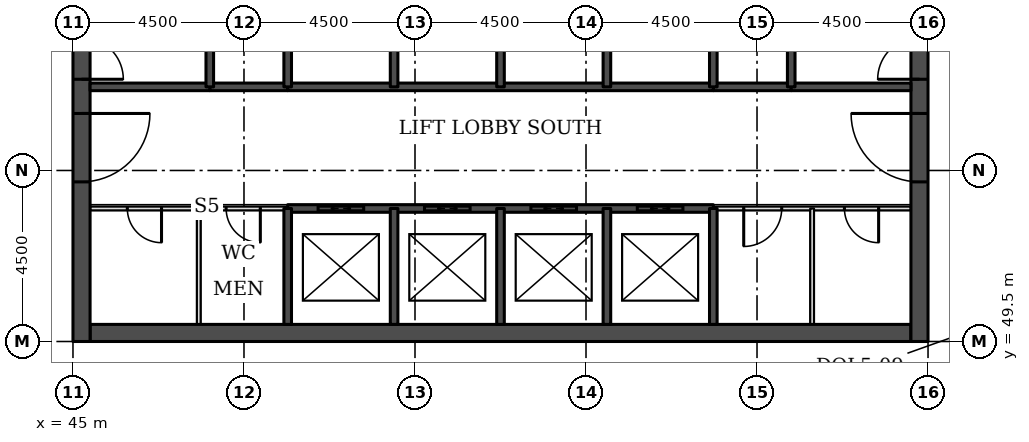
"""IFC4 building model, lengths in metres.
Left out: names, types, materials, properties, quantities, classifications, styles, units other than length and angle.
Written with IfcOpenShell. Run it as: python <this file> out.ifc"""

import sys

from ifc_helpers import new_model, si_unit, direction, frame, frame_2d, origin, place, context, subcontext, project, spatial, rectangle, extrude, element, fill, save


model = new_model("IFC4")
c1 = context("Model", 3, precision=1e-05, world=origin(), true_north=direction((0.0, 1.0)))
c2 = subcontext(c1, "Body", "Model", "MODEL_VIEW")
j1 = project(units=[si_unit("LENGTHUNIT", "METRE"), si_unit("PLANEANGLEUNIT", "RADIAN")], contexts=[c1])
p1 = place(None, origin())
s1 = spatial("IfcSite", under=j1, at=p1, CompositionType="ELEMENT")
p2 = place(p1, origin())
s2 = spatial("IfcBuilding", under=s1, at=p2, CompositionType="ELEMENT")
p3 = place(p2, frame((0.0, 0.0, 112.2)))
s3 = spatial("IfcBuildingStorey", under=s2, at=p3, CompositionType="ELEMENT", Elevation=112.2)
p4 = place(p3, frame((45.45, 49.725, 0.0), z_axis=(0.0, 0.0, 1.0), x_axis=(1.0, 0.0, 0.0)))
e1 = element("IfcWall", 1, at=p4, inside=s3, PredefinedType="SHEAR", context=c2, shape_type="SweptSolid", body=[
    extrude(rectangle(XDim=21.6, YDim=0.45, at=frame_2d((10.8, 0.0))), origin(), (0.0, 0.0, 1.0), 3.7),
])
p5 = place(p3, frame((45.225, 49.5, 0.0), z_axis=(0.0, 0.0, 1.0), x_axis=(0.0, 1.0, 0.0)))
e2 = element("IfcWall", 2, at=p5, inside=s3, PredefinedType="SHEAR", context=c2, shape_type="SweptSolid", body=[
    extrude(rectangle(XDim=22.5, YDim=0.45, at=frame_2d((11.25, 0.0))), origin(), (0.0, 0.0, 1.0), 3.7),
])
p6 = place(p5, frame((4.2, 0.0, 0.0)))
e3 = element("IfcOpeningElement", 3, at=p6, cuts=e2, PredefinedType="OPENING", context=c2, shape_type="SweptSolid", body=[
    extrude(rectangle(XDim=1.8, YDim=2.1, at=frame_2d((0.9, 1.05))), frame((0.0, 0.235, 0.0), z_axis=(0.0, -1.0, 0.0), x_axis=(1.0, 0.0, 0.0)), (0.0, 0.0, 1.0), 0.47),
])
p7 = place(p5, frame((6.9, 0.0, 0.0)))
e4 = element("IfcOpeningElement", 4, at=p7, cuts=e2, PredefinedType="OPENING", context=c2, shape_type="SweptSolid", body=[
    extrude(rectangle(XDim=1.1, YDim=2.1, at=frame_2d((0.55, 1.05))), frame((0.0, 0.235, 0.0), z_axis=(0.0, -1.0, 0.0), x_axis=(1.0, 0.0, 0.0)), (0.0, 0.0, 1.0), 0.47),
])
p8 = place(p5, frame((13.6, 0.0, 0.0)))
e5 = element("IfcOpeningElement", 5, at=p8, cuts=e2, PredefinedType="OPENING", context=c2, shape_type="SweptSolid", body=[
    extrude(rectangle(XDim=1.1, YDim=2.1, at=frame_2d((0.55, 1.05))), frame((0.0, 0.235, 0.0), z_axis=(0.0, -1.0, 0.0), x_axis=(1.0, 0.0, 0.0)), (0.0, 0.0, 1.0), 0.47),
])
p9 = place(p5, frame((16.5, 0.0, 0.0)))
e6 = element("IfcOpeningElement", 6, at=p9, cuts=e2, PredefinedType="OPENING", context=c2, shape_type="SweptSolid", body=[
    extrude(rectangle(XDim=1.8, YDim=2.1, at=frame_2d((0.9, 1.05))), frame((0.0, 0.235, 0.0), z_axis=(0.0, -1.0, 0.0), x_axis=(1.0, 0.0, 0.0)), (0.0, 0.0, 1.0), 0.47),
])
p10 = place(p3, frame((67.275, 49.5, 0.0), z_axis=(0.0, 0.0, 1.0), x_axis=(0.0, 1.0, 0.0)))
e7 = element("IfcWall", 7, at=p10, inside=s3, PredefinedType="SHEAR", context=c2, shape_type="SweptSolid", body=[
    extrude(rectangle(XDim=22.5, YDim=0.45, at=frame_2d((11.25, 0.0))), origin(), (0.0, 0.0, 1.0), 3.7),
])
p11 = place(p10, frame((4.2, 0.0, 0.0)))
e8 = element("IfcOpeningElement", 8, at=p11, cuts=e7, PredefinedType="OPENING", context=c2, shape_type="SweptSolid", body=[
    extrude(rectangle(XDim=1.8, YDim=2.1, at=frame_2d((0.9, 1.05))), frame((0.0, 0.235, 0.0), z_axis=(0.0, -1.0, 0.0), x_axis=(1.0, 0.0, 0.0)), (0.0, 0.0, 1.0), 0.47),
])
p12 = place(p10, frame((6.9, 0.0, 0.0)))
e9 = element("IfcOpeningElement", 9, at=p12, cuts=e7, PredefinedType="OPENING", context=c2, shape_type="SweptSolid", body=[
    extrude(rectangle(XDim=1.1, YDim=2.1, at=frame_2d((0.55, 1.05))), frame((0.0, 0.235, 0.0), z_axis=(0.0, -1.0, 0.0), x_axis=(1.0, 0.0, 0.0)), (0.0, 0.0, 1.0), 0.47),
])
p13 = place(p10, frame((13.6, 0.0, 0.0)))
e10 = element("IfcOpeningElement", 10, at=p13, cuts=e7, PredefinedType="OPENING", context=c2, shape_type="SweptSolid", body=[
    extrude(rectangle(XDim=1.1, YDim=2.1, at=frame_2d((0.55, 1.05))), frame((0.0, 0.235, 0.0), z_axis=(0.0, -1.0, 0.0), x_axis=(1.0, 0.0, 0.0)), (0.0, 0.0, 1.0), 0.47),
])
p14 = place(p10, frame((16.5, 0.0, 0.0)))
e11 = element("IfcOpeningElement", 11, at=p14, cuts=e7, PredefinedType="OPENING", context=c2, shape_type="SweptSolid", body=[
    extrude(rectangle(XDim=1.8, YDim=2.1, at=frame_2d((0.9, 1.05))), frame((0.0, 0.235, 0.0), z_axis=(0.0, -1.0, 0.0), x_axis=(1.0, 0.0, 0.0)), (0.0, 0.0, 1.0), 0.47),
])
p15 = place(p3, frame((45.45, 53.0, 0.0), z_axis=(0.0, 0.0, 1.0), x_axis=(1.0, 0.0, 0.0)))
e12 = element("IfcWall", 12, at=p15, inside=s3, PredefinedType="PARTITIONING", context=c2, shape_type="SweptSolid", body=[
    extrude(rectangle(XDim=5.2, YDim=0.1, at=frame_2d((2.6, 0.0))), origin(), (0.0, 0.0, 1.0), 3.55),
])
p16 = place(p15, frame((0.98, 0.0, 0.0)))
e13 = element("IfcOpeningElement", 13, at=p16, cuts=e12, PredefinedType="OPENING", context=c2, shape_type="SweptSolid", body=[
    extrude(rectangle(XDim=0.9, YDim=2.1, at=frame_2d((0.45, 1.05))), frame((0.0, 0.06, 0.0), z_axis=(0.0, -1.0, 0.0), x_axis=(1.0, 0.0, 0.0)), (0.0, 0.0, 1.0), 0.12),
])
p17 = place(p15, frame((3.58, 0.0, 0.0)))
e14 = element("IfcOpeningElement", 14, at=p17, cuts=e12, PredefinedType="OPENING", context=c2, shape_type="SweptSolid", body=[
    extrude(rectangle(XDim=0.9, YDim=2.1, at=frame_2d((0.45, 1.05))), frame((0.0, 0.06, 0.0), z_axis=(0.0, -1.0, 0.0), x_axis=(1.0, 0.0, 0.0)), (0.0, 0.0, 1.0), 0.12),
])
p18 = place(p3, frame((61.85, 53.0, 0.0), z_axis=(0.0, 0.0, 1.0), x_axis=(1.0, 0.0, 0.0)))
e15 = element("IfcWall", 15, at=p18, inside=s3, PredefinedType="PARTITIONING", context=c2, shape_type="SweptSolid", body=[
    extrude(rectangle(XDim=5.2, YDim=0.1, at=frame_2d((2.6, 0.0))), origin(), (0.0, 0.0, 1.0), 3.55),
])
p19 = place(p18, frame((3.45, 0.0, 0.0)))
e16 = element("IfcOpeningElement", 16, at=p19, cuts=e15, PredefinedType="OPENING", context=c2, shape_type="SweptSolid", body=[
    extrude(rectangle(XDim=0.9, YDim=2.1, at=frame_2d((0.45, 1.05))), frame((0.0, 0.06, 0.0), z_axis=(0.0, -1.0, 0.0), x_axis=(1.0, 0.0, 0.0)), (0.0, 0.0, 1.0), 0.12),
])
p20 = place(p18, frame((0.8, 0.0, 0.0)))
e17 = element("IfcOpeningElement", 17, at=p20, cuts=e15, PredefinedType="OPENING", context=c2, shape_type="SweptSolid", body=[
    extrude(rectangle(XDim=1.0, YDim=2.1, at=frame_2d((0.5, 1.05))), frame((0.0, 0.06, 0.0), z_axis=(0.0, -1.0, 0.0), x_axis=(1.0, 0.0, 0.0)), (0.0, 0.0, 1.0), 0.12),
])
p21 = place(p3, frame((50.65, 53.0, 0.0), z_axis=(0.0, 0.0, 1.0), x_axis=(1.0, 0.0, 0.0)))
e18 = element("IfcWall", 18, at=p21, inside=s3, PredefinedType="SOLIDWALL", context=c2, shape_type="SweptSolid", body=[
    extrude(rectangle(XDim=11.2, YDim=0.2, at=frame_2d((5.6, 0.0))), origin(), (0.0, 0.0, 1.0), 3.55),
])
p22 = place(p21, frame((0.8, 0.0, 0.0)))
e19 = element("IfcOpeningElement", 19, at=p22, cuts=e18, PredefinedType="OPENING", context=c2, shape_type="SweptSolid", body=[
    extrude(rectangle(XDim=1.2, YDim=2.1, at=frame_2d((0.6, 1.05))), frame((0.0, 0.11, 0.0), z_axis=(0.0, -1.0, 0.0), x_axis=(1.0, 0.0, 0.0)), (0.0, 0.0, 1.0), 0.22),
])
p23 = place(p21, frame((3.6, 0.0, 0.0)))
e20 = element("IfcOpeningElement", 20, at=p23, cuts=e18, PredefinedType="OPENING", context=c2, shape_type="SweptSolid", body=[
    extrude(rectangle(XDim=1.2, YDim=2.1, at=frame_2d((0.6, 1.05))), frame((0.0, 0.11, 0.0), z_axis=(0.0, -1.0, 0.0), x_axis=(1.0, 0.0, 0.0)), (0.0, 0.0, 1.0), 0.22),
])
p24 = place(p21, frame((6.4, 0.0, 0.0)))
e21 = element("IfcOpeningElement", 21, at=p24, cuts=e18, PredefinedType="OPENING", context=c2, shape_type="SweptSolid", body=[
    extrude(rectangle(XDim=1.2, YDim=2.1, at=frame_2d((0.6, 1.05))), frame((0.0, 0.11, 0.0), z_axis=(0.0, -1.0, 0.0), x_axis=(1.0, 0.0, 0.0)), (0.0, 0.0, 1.0), 0.22),
])
p25 = place(p21, frame((9.2, 0.0, 0.0)))
e22 = element("IfcOpeningElement", 22, at=p25, cuts=e18, PredefinedType="OPENING", context=c2, shape_type="SweptSolid", body=[
    extrude(rectangle(XDim=1.2, YDim=2.1, at=frame_2d((0.6, 1.05))), frame((0.0, 0.11, 0.0), z_axis=(0.0, -1.0, 0.0), x_axis=(1.0, 0.0, 0.0)), (0.0, 0.0, 1.0), 0.22),
])
for number, where, z_axis, x_axis in (
    (23, (48.6, 56.2, 0.0), (0.0, 0.0, 1.0), (1.0, 0.0, 0.0)),
    (24, (61.85, 56.2, 0.0), (0.0, 0.0, 1.0), (1.0, 0.0, 0.0)),
):
    element("IfcWall", number, at=place(p3, frame(where, z_axis=z_axis, x_axis=x_axis)), inside=s3, PredefinedType="SOLIDWALL", context=c2, shape_type="SweptSolid", body=[
        extrude(rectangle(XDim=2.05, YDim=0.2, at=frame_2d((1.025, 0.0))), origin(), (0.0, 0.0, 1.0), 3.55),
    ])
p26 = place(p3, frame((45.45, 56.2, 0.0), z_axis=(0.0, 0.0, 1.0), x_axis=(1.0, 0.0, 0.0)))
e25 = element("IfcWall", 25, at=p26, inside=s3, PredefinedType="SOLIDWALL", context=c2, shape_type="SweptSolid", body=[
    extrude(rectangle(XDim=3.15, YDim=0.2, at=frame_2d((1.575, 0.0))), origin(), (0.0, 0.0, 1.0), 3.55),
])
p27 = place(p3, frame((50.65, 56.2, 0.0), z_axis=(0.0, 0.0, 1.0), x_axis=(1.0, 0.0, 0.0)))
e26 = element("IfcWall", 26, at=p27, inside=s3, PredefinedType="SOLIDWALL", context=c2, shape_type="SweptSolid", body=[
    extrude(rectangle(XDim=11.2, YDim=0.2, at=frame_2d((5.6, 0.0))), origin(), (0.0, 0.0, 1.0), 3.55),
])
p28 = place(p3, frame((63.9, 56.2, 0.0), z_axis=(0.0, 0.0, 1.0), x_axis=(1.0, 0.0, 0.0)))
e27 = element("IfcWall", 27, at=p28, inside=s3, PredefinedType="SOLIDWALL", context=c2, shape_type="SweptSolid", body=[
    extrude(rectangle(XDim=3.15, YDim=0.2, at=frame_2d((1.575, 0.0))), origin(), (0.0, 0.0, 1.0), 3.55),
])
p29 = place(p3, frame((48.31, 49.95, 0.0), z_axis=(0.0, 0.0, 1.0), x_axis=(0.0, 1.0, 0.0)))
e28 = element("IfcWall", 28, at=p29, inside=s3, PredefinedType="PARTITIONING", context=c2, shape_type="SweptSolid", body=[
    extrude(rectangle(XDim=3.05, YDim=0.1, at=frame_2d((1.525, 0.0))), origin(), (0.0, 0.0, 1.0), 3.55),
])
p30 = place(p3, frame((48.6, 56.2, 0.0), z_axis=(0.0, 0.0, 1.0), x_axis=(0.0, 1.0, 0.0)))
e29 = element("IfcWall", 29, at=p30, inside=s3, PredefinedType="SOLIDWALL", context=c2, shape_type="SweptSolid", body=[
    extrude(rectangle(XDim=5.8, YDim=0.2, at=frame_2d((2.9, 0.0))), origin(), (0.0, 0.0, 1.0), 3.55),
])
p31 = place(p3, frame((50.65, 49.95, 0.0), z_axis=(0.0, 0.0, 1.0), x_axis=(0.0, 1.0, 0.0)))
e30 = element("IfcWall", 30, at=p31, inside=s3, PredefinedType="SOLIDWALL", context=c2, shape_type="SweptSolid", body=[
    extrude(rectangle(XDim=3.05, YDim=0.2, at=frame_2d((1.525, 0.0))), origin(), (0.0, 0.0, 1.0), 3.55),
])
p32 = place(p3, frame((50.65, 56.2, 0.0), z_axis=(0.0, 0.0, 1.0), x_axis=(0.0, 1.0, 0.0)))
e31 = element("IfcWall", 31, at=p32, inside=s3, PredefinedType="SOLIDWALL", context=c2, shape_type="SweptSolid", body=[
    extrude(rectangle(XDim=2.8, YDim=0.2, at=frame_2d((1.4, 0.0))), origin(), (0.0, 0.0, 1.0), 3.55),
])
p33 = place(p3, frame((53.45, 49.95, 0.0), z_axis=(0.0, 0.0, 1.0), x_axis=(0.0, 1.0, 0.0)))
e32 = element("IfcWall", 32, at=p33, inside=s3, PredefinedType="SOLIDWALL", context=c2, shape_type="SweptSolid", body=[
    extrude(rectangle(XDim=3.05, YDim=0.2, at=frame_2d((1.525, 0.0))), origin(), (0.0, 0.0, 1.0), 3.55),
])
p34 = place(p3, frame((53.45, 56.2, 0.0), z_axis=(0.0, 0.0, 1.0), x_axis=(0.0, 1.0, 0.0)))
e33 = element("IfcWall", 33, at=p34, inside=s3, PredefinedType="SOLIDWALL", context=c2, shape_type="SweptSolid", body=[
    extrude(rectangle(XDim=2.8, YDim=0.2, at=frame_2d((1.4, 0.0))), origin(), (0.0, 0.0, 1.0), 3.55),
])
p35 = place(p3, frame((56.25, 49.95, 0.0), z_axis=(0.0, 0.0, 1.0), x_axis=(0.0, 1.0, 0.0)))
e34 = element("IfcWall", 34, at=p35, inside=s3, PredefinedType="SOLIDWALL", context=c2, shape_type="SweptSolid", body=[
    extrude(rectangle(XDim=3.05, YDim=0.2, at=frame_2d((1.525, 0.0))), origin(), (0.0, 0.0, 1.0), 3.55),
])
p36 = place(p3, frame((56.25, 56.2, 0.0), z_axis=(0.0, 0.0, 1.0), x_axis=(0.0, 1.0, 0.0)))
e35 = element("IfcWall", 35, at=p36, inside=s3, PredefinedType="SOLIDWALL", context=c2, shape_type="SweptSolid", body=[
    extrude(rectangle(XDim=2.8, YDim=0.2, at=frame_2d((1.4, 0.0))), origin(), (0.0, 0.0, 1.0), 3.55),
])
p37 = place(p3, frame((59.05, 49.95, 0.0), z_axis=(0.0, 0.0, 1.0), x_axis=(0.0, 1.0, 0.0)))
e36 = element("IfcWall", 36, at=p37, inside=s3, PredefinedType="SOLIDWALL", context=c2, shape_type="SweptSolid", body=[
    extrude(rectangle(XDim=3.05, YDim=0.2, at=frame_2d((1.525, 0.0))), origin(), (0.0, 0.0, 1.0), 3.55),
])
p38 = place(p3, frame((59.05, 56.2, 0.0), z_axis=(0.0, 0.0, 1.0), x_axis=(0.0, 1.0, 0.0)))
e37 = element("IfcWall", 37, at=p38, inside=s3, PredefinedType="SOLIDWALL", context=c2, shape_type="SweptSolid", body=[
    extrude(rectangle(XDim=2.8, YDim=0.2, at=frame_2d((1.4, 0.0))), origin(), (0.0, 0.0, 1.0), 3.55),
])
p39 = place(p3, frame((61.85, 49.95, 0.0), z_axis=(0.0, 0.0, 1.0), x_axis=(0.0, 1.0, 0.0)))
e38 = element("IfcWall", 38, at=p39, inside=s3, PredefinedType="SOLIDWALL", context=c2, shape_type="SweptSolid", body=[
    extrude(rectangle(XDim=3.05, YDim=0.2, at=frame_2d((1.525, 0.0))), origin(), (0.0, 0.0, 1.0), 3.55),
])
p40 = place(p3, frame((61.85, 56.2, 0.0), z_axis=(0.0, 0.0, 1.0), x_axis=(0.0, 1.0, 0.0)))
e39 = element("IfcWall", 39, at=p40, inside=s3, PredefinedType="SOLIDWALL", context=c2, shape_type="SweptSolid", body=[
    extrude(rectangle(XDim=2.8, YDim=0.2, at=frame_2d((1.4, 0.0))), origin(), (0.0, 0.0, 1.0), 3.55),
])
p41 = place(p3, frame((63.9, 56.2, 0.0), z_axis=(0.0, 0.0, 1.0), x_axis=(0.0, 1.0, 0.0)))
e40 = element("IfcWall", 40, at=p41, inside=s3, PredefinedType="SOLIDWALL", context=c2, shape_type="SweptSolid", body=[
    extrude(rectangle(XDim=5.8, YDim=0.2, at=frame_2d((2.9, 0.0))), origin(), (0.0, 0.0, 1.0), 3.55),
])
p42 = place(p3, frame((64.45, 49.95, 0.0), z_axis=(0.0, 0.0, 1.0), x_axis=(0.0, 1.0, 0.0)))
e41 = element("IfcWall", 41, at=p42, inside=s3, PredefinedType="PARTITIONING", context=c2, shape_type="SweptSolid", body=[
    extrude(rectangle(XDim=3.05, YDim=0.1, at=frame_2d((1.525, 0.0))), origin(), (0.0, 0.0, 1.0), 3.55),
])
p43 = place(p22, origin())
e42 = element("IfcDoor", 42, at=p43, inside=s3, OperationType="DOUBLE_DOOR_SLIDING", PredefinedType="DOOR", context=c2, shape_type="SweptSolid", body=[
    extrude(rectangle(XDim=1.2, YDim=2.1, at=frame_2d((0.6, 1.05))), frame((0.0, 0.025, 0.0), z_axis=(0.0, -1.0, 0.0), x_axis=(1.0, 0.0, 0.0)), (0.0, 0.0, 1.0), 0.05),
])
fill(e19, e42)
p44 = place(p23, origin())
e43 = element("IfcDoor", 43, at=p44, inside=s3, OperationType="DOUBLE_DOOR_SLIDING", PredefinedType="DOOR", context=c2, shape_type="SweptSolid", body=[
    extrude(rectangle(XDim=1.2, YDim=2.1, at=frame_2d((0.6, 1.05))), frame((0.0, 0.025, 0.0), z_axis=(0.0, -1.0, 0.0), x_axis=(1.0, 0.0, 0.0)), (0.0, 0.0, 1.0), 0.05),
])
fill(e20, e43)
p45 = place(p24, origin())
e44 = element("IfcDoor", 44, at=p45, inside=s3, OperationType="DOUBLE_DOOR_SLIDING", PredefinedType="DOOR", context=c2, shape_type="SweptSolid", body=[
    extrude(rectangle(XDim=1.2, YDim=2.1, at=frame_2d((0.6, 1.05))), frame((0.0, 0.025, 0.0), z_axis=(0.0, -1.0, 0.0), x_axis=(1.0, 0.0, 0.0)), (0.0, 0.0, 1.0), 0.05),
])
fill(e21, e44)
p46 = place(p25, origin())
e45 = element("IfcDoor", 45, at=p46, inside=s3, OperationType="DOUBLE_DOOR_SLIDING", PredefinedType="DOOR", context=c2, shape_type="SweptSolid", body=[
    extrude(rectangle(XDim=1.2, YDim=2.1, at=frame_2d((0.6, 1.05))), frame((0.0, 0.025, 0.0), z_axis=(0.0, -1.0, 0.0), x_axis=(1.0, 0.0, 0.0)), (0.0, 0.0, 1.0), 0.05),
])
fill(e22, e45)
p47 = place(p6, frame((1.8, 0.0, 0.0), z_axis=(0.0, 0.0, 1.0), x_axis=(-1.0, 0.0, 0.0)))
e46 = element("IfcDoor", 46, at=p47, inside=s3, OperationType="SINGLE_SWING_LEFT", PredefinedType="DOOR", context=c2, shape_type="SweptSolid", body=[
    extrude(rectangle(XDim=1.8, YDim=2.1, at=frame_2d((0.9, 1.05))), frame((0.0, 0.025, 0.0), z_axis=(0.0, -1.0, 0.0), x_axis=(1.0, 0.0, 0.0)), (0.0, 0.0, 1.0), 0.05),
])
fill(e3, e46)
p48 = place(p7, frame((1.1, 0.0, 0.0), z_axis=(0.0, 0.0, 1.0), x_axis=(-1.0, 0.0, 0.0)))
e47 = element("IfcDoor", 47, at=p48, inside=s3, OperationType="SINGLE_SWING_RIGHT", PredefinedType="DOOR", context=c2, shape_type="SweptSolid", body=[
    extrude(rectangle(XDim=1.1, YDim=2.1, at=frame_2d((0.55, 1.05))), frame((0.0, 0.025, 0.0), z_axis=(0.0, -1.0, 0.0), x_axis=(1.0, 0.0, 0.0)), (0.0, 0.0, 1.0), 0.05),
])
fill(e4, e47)
p49 = place(p11, origin())
e48 = element("IfcDoor", 48, at=p49, inside=s3, OperationType="SINGLE_SWING_RIGHT", PredefinedType="DOOR", context=c2, shape_type="SweptSolid", body=[
    extrude(rectangle(XDim=1.8, YDim=2.1, at=frame_2d((0.9, 1.05))), frame((0.0, 0.025, 0.0), z_axis=(0.0, -1.0, 0.0), x_axis=(1.0, 0.0, 0.0)), (0.0, 0.0, 1.0), 0.05),
])
fill(e8, e48)
p50 = place(p12, origin())
e49 = element("IfcDoor", 49, at=p50, inside=s3, OperationType="SINGLE_SWING_LEFT", PredefinedType="DOOR", context=c2, shape_type="SweptSolid", body=[
    extrude(rectangle(XDim=1.1, YDim=2.1, at=frame_2d((0.55, 1.05))), frame((0.0, 0.025, 0.0), z_axis=(0.0, -1.0, 0.0), x_axis=(1.0, 0.0, 0.0)), (0.0, 0.0, 1.0), 0.05),
])
fill(e9, e49)
p51 = place(p19, frame((0.9, 0.0, 0.0), z_axis=(0.0, 0.0, 1.0), x_axis=(-1.0, 0.0, 0.0)))
e50 = element("IfcDoor", 50, at=p51, inside=s3, OperationType="SINGLE_SWING_LEFT", PredefinedType="DOOR", context=c2, shape_type="SweptSolid", body=[
    extrude(rectangle(XDim=0.9, YDim=2.1, at=frame_2d((0.45, 1.05))), frame((0.0, 0.025, 0.0), z_axis=(0.0, -1.0, 0.0), x_axis=(1.0, 0.0, 0.0)), (0.0, 0.0, 1.0), 0.05),
])
fill(e16, e50)
p52 = place(p20, frame((1.0, 0.0, 0.0), z_axis=(0.0, 0.0, 1.0), x_axis=(-1.0, 0.0, 0.0)))
e51 = element("IfcDoor", 51, at=p52, inside=s3, OperationType="SINGLE_SWING_RIGHT", PredefinedType="DOOR", context=c2, shape_type="SweptSolid", body=[
    extrude(rectangle(XDim=1.0, YDim=2.1, at=frame_2d((0.5, 1.05))), frame((0.0, 0.025, 0.0), z_axis=(0.0, -1.0, 0.0), x_axis=(1.0, 0.0, 0.0)), (0.0, 0.0, 1.0), 0.05),
])
fill(e17, e51)
p53 = place(p16, frame((0.9, 0.0, 0.0), z_axis=(0.0, 0.0, 1.0), x_axis=(-1.0, 0.0, 0.0)))
e52 = element("IfcDoor", 52, at=p53, inside=s3, OperationType="SINGLE_SWING_LEFT", PredefinedType="DOOR", context=c2, shape_type="SweptSolid", body=[
    extrude(rectangle(XDim=0.9, YDim=2.1, at=frame_2d((0.45, 1.05))), frame((0.0, 0.025, 0.0), z_axis=(0.0, -1.0, 0.0), x_axis=(1.0, 0.0, 0.0)), (0.0, 0.0, 1.0), 0.05),
])
fill(e13, e52)
p54 = place(p17, frame((0.9, 0.0, 0.0), z_axis=(0.0, 0.0, 1.0), x_axis=(-1.0, 0.0, 0.0)))
e53 = element("IfcDoor", 53, at=p54, inside=s3, OperationType="SINGLE_SWING_LEFT", PredefinedType="DOOR", context=c2, shape_type="SweptSolid", body=[
    extrude(rectangle(XDim=0.9, YDim=2.1, at=frame_2d((0.45, 1.05))), frame((0.0, 0.025, 0.0), z_axis=(0.0, -1.0, 0.0), x_axis=(1.0, 0.0, 0.0)), (0.0, 0.0, 1.0), 0.05),
])
fill(e14, e53)
save(model, sys.argv[1])
